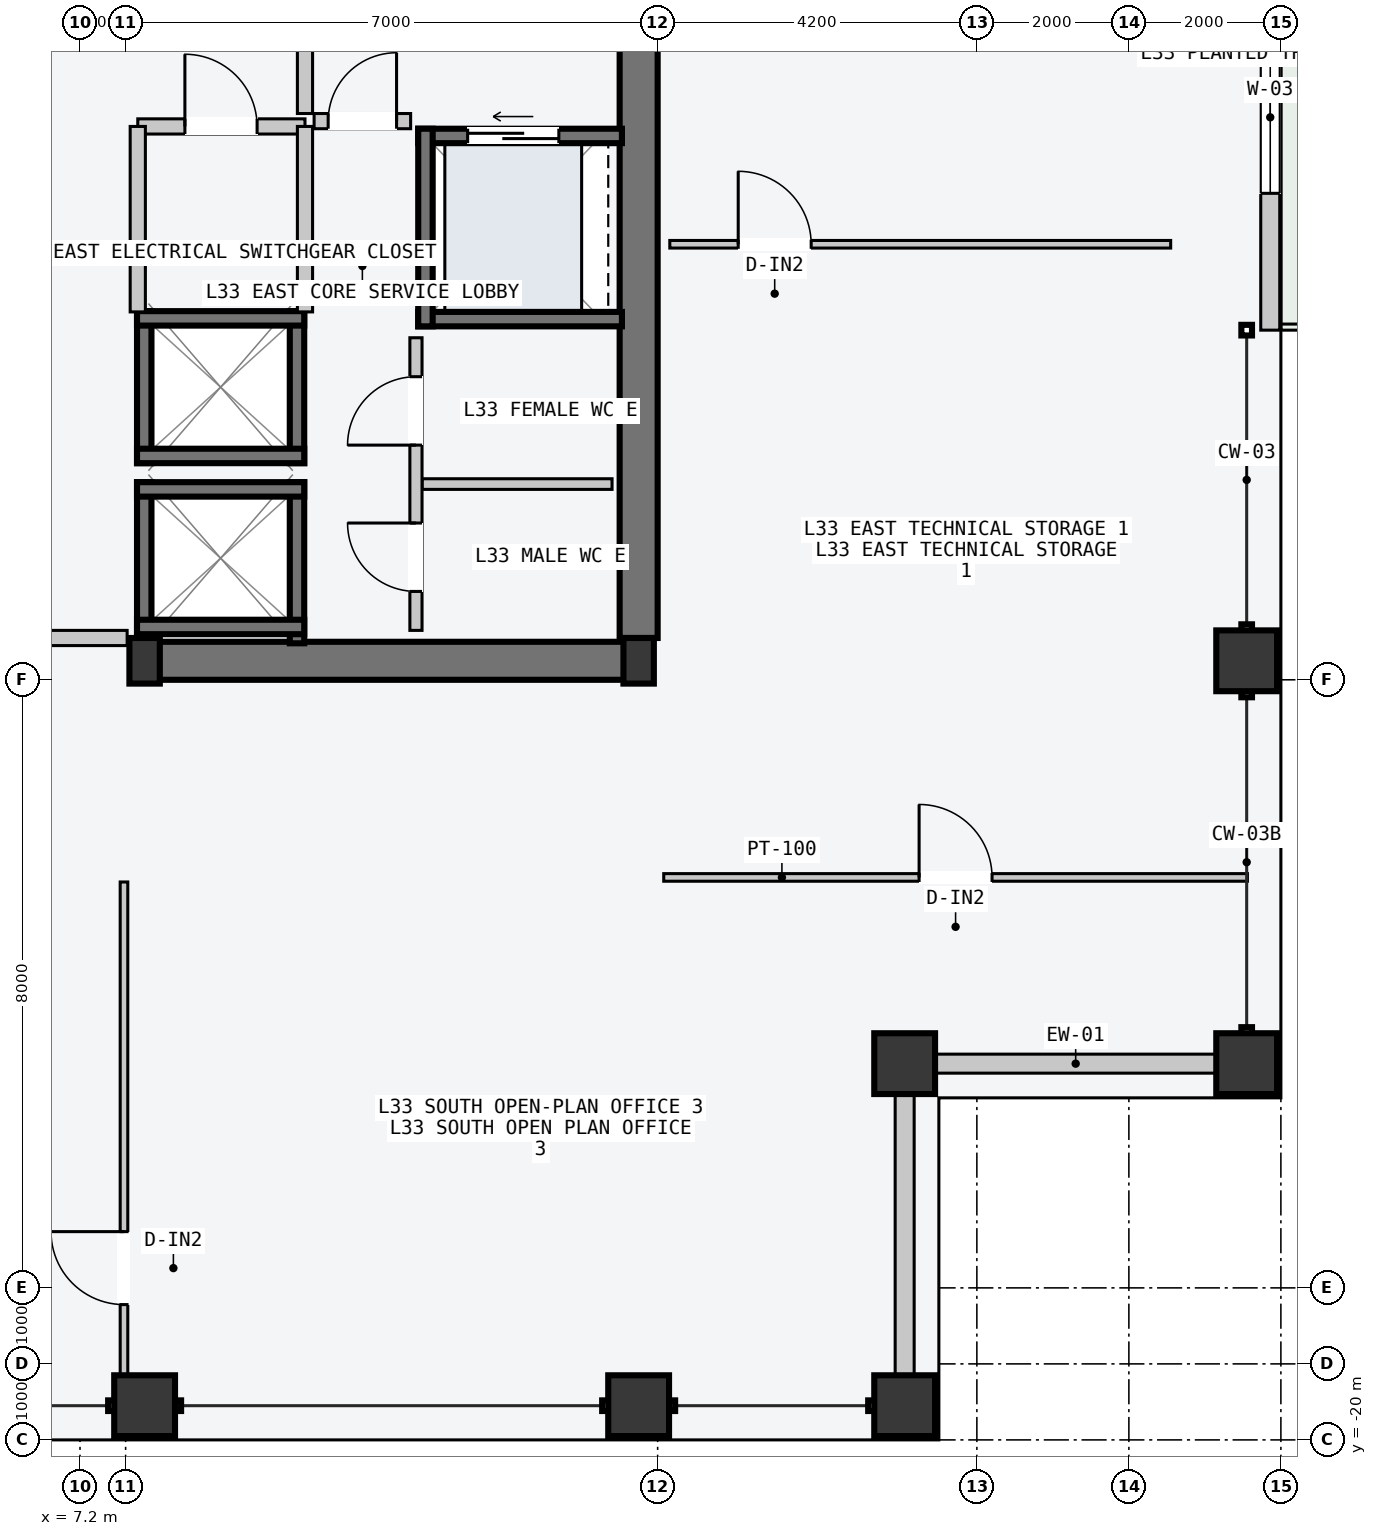
"""IFC4 building model, lengths in metres.
Left out: names, types, materials, properties, quantities, classifications, styles, units other than length and angle.
Written with IfcOpenShell. Run it as: python <this file> out.ifc"""

import sys

from ifc_helpers import new_model, si_unit, direction, frame, frame_2d, origin, origin_2d, place, context, subcontext, project, spatial, rectangle, hollow_rectangle, i_section, extrude, element, fill, save


model = new_model("IFC4")
c1 = context("Model", 3, precision=1e-05, world=origin(), true_north=direction((0.0, 1.0)))
c2 = subcontext(c1, "Body", "Model", "MODEL_VIEW")
j1 = project(units=[si_unit("LENGTHUNIT", "METRE"), si_unit("PLANEANGLEUNIT", "RADIAN")], contexts=[c1])
p1 = place(None, origin())
s1 = spatial("IfcSite", under=j1, at=p1, CompositionType="ELEMENT")
p2 = place(p1, origin())
s2 = spatial("IfcBuilding", under=s1, at=p2, CompositionType="ELEMENT")
p3 = place(p2, frame((0.0, 0.0, 127.8)))
s3 = spatial("IfcBuildingStorey", under=s2, at=p3, CompositionType="ELEMENT", Elevation=127.8)
p4 = place(p3, frame((8.07, -9.75, -0.2), z_axis=(0.0, 0.0, 1.0), x_axis=(1.0, 0.0, 0.0)))
e1 = element("IfcWall", 1, at=p4, inside=s3, PredefinedType="SHEAR", context=c2, shape_type="SweptSolid", body=[
    extrude(rectangle(XDim=6.46, YDim=0.5, at=frame_2d((3.23, 0.0))), origin(), (0.0, 0.0, 1.0), 3.6),
])
p5 = place(p3, frame((14.55, -9.45, -0.2), z_axis=(0.0, 0.0, 1.0), x_axis=(0.0, 1.0, 0.0)))
e2 = element("IfcWall", 2, at=p5, inside=s3, PredefinedType="SHEAR", context=c2, shape_type="SweptSolid", body=[
    extrude(rectangle(XDim=9.15, YDim=0.5, at=frame_2d((4.575, 0.0))), origin(), (0.0, 0.0, 1.0), 3.6),
])
for number, where, z_axis, x_axis in (
    (3, (8.05, -9.75, 0.0), (0.0, 0.0, 1.0), (1.0, 0.0, 0.0)),
    (4, (14.55, -9.75, 0.0), (0.0, 0.0, 1.0), (1.0, 0.0, 0.0)),
):
    element("IfcColumn", number, at=place(p3, frame(where, z_axis=z_axis, x_axis=x_axis)), inside=s3, PredefinedType="COLUMN", context=c2, shape_type="SweptSolid", body=[
        extrude(i_section(OverallWidth=0.4, OverallDepth=0.6, WebThickness=0.022, FlangeThickness=0.036, at=origin_2d()), origin(), (0.0, 0.0, 1.0), 3.6),
    ])
for number, where, z_axis, x_axis in (
    (5, (8.05, -19.55, 0.0), (0.0, 0.0, 1.0), (1.0, 0.0, 0.0)),
    (6, (14.55, -19.55, 0.0), (0.0, 0.0, 1.0), (1.0, 0.0, 0.0)),
    (7, (18.05, -19.55, 0.0), (0.0, 0.0, 1.0), (1.0, 0.0, 0.0)),
    (8, (22.55, -15.05, 0.0), (0.0, 0.0, 1.0), (0.0, 1.0, 0.0)),
    (9, (22.55, -9.75, 0.0), (0.0, 0.0, 1.0), (0.0, 1.0, 0.0)),
    (10, (18.05, -15.05, 0.0), (0.0, 0.0, 1.0), (1.0, 0.0, 0.0)),
):
    element("IfcColumn", number, at=place(p3, frame(where, z_axis=z_axis, x_axis=x_axis)), inside=s3, PredefinedType="COLUMN", context=c2, shape_type="SweptSolid", body=[
        extrude(hollow_rectangle(XDim=0.8, YDim=0.8, WallThickness=0.036, at=origin_2d()), origin(), (0.0, 0.0, 1.0), 3.6),
    ])
p6 = place(p3, frame((22.86, -5.4, 0.0), z_axis=(0.0, 0.0, 1.0), x_axis=(0.0, 1.0, 0.0)))
e11 = element("IfcWall", 11, at=p6, inside=s3, PredefinedType="STANDARD", context=c2, shape_type="SweptSolid", body=[
    extrude(rectangle(XDim=10.8, YDim=0.25, at=frame_2d((5.4, 0.0))), origin(), (0.0, 0.0, 1.0), 3.4),
])
p7 = place(p6, frame((7.2, 0.0, 0.0)))
e12 = element("IfcOpeningElement", 12, at=p7, cuts=e11, PredefinedType="OPENING", context=c2, shape_type="SweptSolid", body=[
    extrude(rectangle(XDim=1.6, YDim=2.2, at=frame_2d((0.8, 1.1))), frame((0.0, 0.135, 0.0), z_axis=(0.0, -1.0, 0.0), x_axis=(1.0, 0.0, 0.0)), (0.0, 0.0, 1.0), 0.27),
])
p8 = place(p6, frame((1.8, 0.0, 0.85)))
e13 = element("IfcOpeningElement", 13, at=p8, cuts=e11, PredefinedType="OPENING", context=c2, shape_type="SweptSolid", body=[
    extrude(rectangle(XDim=2.0, YDim=2.1, at=frame_2d((1.0, 1.05))), frame((0.0, 0.135, 0.0), z_axis=(0.0, -1.0, 0.0), x_axis=(1.0, 0.0, 0.0)), (0.0, 0.0, 1.0), 0.27),
])
for number, where, z_axis, x_axis in (
    (14, (18.46, -15.05, 0.0), (0.0, 0.0, 1.0), (1.0, 0.0, 0.0)),
    (15, (18.05, -19.14, 0.0), (0.0, 0.0, 1.0), (0.0, 1.0, 0.0)),
):
    element("IfcWall", number, at=place(p3, frame(where, z_axis=z_axis, x_axis=x_axis)), inside=s3, PredefinedType="STANDARD", context=c2, shape_type="SweptSolid", body=[
        extrude(rectangle(XDim=3.68, YDim=0.25, at=frame_2d((1.84, 0.0))), origin(), (0.0, 0.0, 1.0), 2.75),
    ])
for number, where, z_axis, x_axis in (
    (16, (8.045, -9.52, -0.2), (0.0, 0.0, 1.0), (0.0, 1.0, 0.0)),
    (17, (10.055, -9.52, -0.2), (0.0, 0.0, 1.0), (0.0, 1.0, 0.0)),
):
    element("IfcWall", number, at=place(p3, frame(where, z_axis=z_axis, x_axis=x_axis)), inside=s3, PredefinedType="SOLIDWALL", context=c2, shape_type="SweptSolid", body=[
        extrude(rectangle(XDim=2.12, YDim=0.19, at=frame_2d((1.06, 0.0))), origin(), (0.0, 0.0, 1.0), 3.6),
    ])
for number, where, z_axis, x_axis in (
    (18, (7.95, -7.495, -0.2), (0.0, 0.0, 1.0), (1.0, 0.0, 0.0)),
    (19, (7.95, -9.305, -0.2), (0.0, 0.0, 1.0), (1.0, 0.0, 0.0)),
):
    element("IfcWall", number, at=place(p3, frame(where, z_axis=z_axis, x_axis=x_axis)), inside=s3, PredefinedType="SOLIDWALL", context=c2, shape_type="SweptSolid", body=[
        extrude(rectangle(XDim=2.2, YDim=0.19, at=frame_2d((1.1, 0.0))), origin(), (0.0, 0.0, 1.0), 3.6),
    ])
for number, where, z_axis, x_axis in (
    (20, (8.045, -7.15, -0.2), (0.0, 0.0, 1.0), (0.0, 1.0, 0.0)),
    (21, (10.055, -7.15, -0.2), (0.0, 0.0, 1.0), (0.0, 1.0, 0.0)),
):
    element("IfcWall", number, at=place(p3, frame(where, z_axis=z_axis, x_axis=x_axis)), inside=s3, PredefinedType="SOLIDWALL", context=c2, shape_type="SweptSolid", body=[
        extrude(rectangle(XDim=2.0, YDim=0.19, at=frame_2d((1.0, 0.0))), origin(), (0.0, 0.0, 1.0), 3.6),
    ])
for number, where, z_axis, x_axis in (
    (22, (7.95, -5.245, -0.2), (0.0, 0.0, 1.0), (1.0, 0.0, 0.0)),
    (23, (7.95, -7.055, -0.2), (0.0, 0.0, 1.0), (1.0, 0.0, 0.0)),
):
    element("IfcWall", number, at=place(p3, frame(where, z_axis=z_axis, x_axis=x_axis)), inside=s3, PredefinedType="SOLIDWALL", context=c2, shape_type="SweptSolid", body=[
        extrude(rectangle(XDim=2.2, YDim=0.19, at=frame_2d((1.1, 0.0))), origin(), (0.0, 0.0, 1.0), 3.6),
    ])
p9 = place(p3, frame((11.65, -2.845, -0.2), z_axis=(0.0, 0.0, 1.0), x_axis=(1.0, 0.0, 0.0)))
e24 = element("IfcWall", 24, at=p9, inside=s3, PredefinedType="SOLIDWALL", context=c2, shape_type="SweptSolid", body=[
    extrude(rectangle(XDim=2.68, YDim=0.19, at=frame_2d((1.34, 0.0))), origin(), (0.0, 0.0, 1.0), 3.6),
])
p10 = place(p9, frame((0.65, 0.0, 0.2)))
e25 = element("IfcOpeningElement", 25, at=p10, cuts=e24, PredefinedType="OPENING", context=c2, shape_type="SweptSolid", body=[
    extrude(rectangle(XDim=1.2, YDim=2.2, at=frame_2d((0.6, 1.1))), frame((0.0, 0.105, 0.0), z_axis=(0.0, -1.0, 0.0), x_axis=(1.0, 0.0, 0.0)), (0.0, 0.0, 1.0), 0.21),
])
p11 = place(p3, frame((11.65, -5.255, -0.2), z_axis=(0.0, 0.0, 1.0), x_axis=(1.0, 0.0, 0.0)))
e26 = element("IfcWall", 26, at=p11, inside=s3, PredefinedType="SOLIDWALL", context=c2, shape_type="SweptSolid", body=[
    extrude(rectangle(XDim=2.68, YDim=0.19, at=frame_2d((1.34, 0.0))), origin(), (0.0, 0.0, 1.0), 3.6),
])
p12 = place(p3, frame((11.745, -5.35, -0.2), z_axis=(0.0, 0.0, 1.0), x_axis=(0.0, 1.0, 0.0)))
e27 = element("IfcWall", 27, at=p12, inside=s3, PredefinedType="SOLIDWALL", context=c2, shape_type="SweptSolid", body=[
    extrude(rectangle(XDim=2.6, YDim=0.19, at=frame_2d((1.3, 0.0))), origin(), (0.0, 0.0, 1.0), 3.6),
])
p13 = place(p3, frame((6.02, -9.45, 0.0), z_axis=(0.0, 0.0, 1.0), x_axis=(1.0, 0.0, 0.0)))
e28 = element("IfcWall", 28, at=p13, inside=s3, PredefinedType="PARTITIONING", context=c2, shape_type="SweptSolid", body=[
    extrude(rectangle(XDim=1.8, YDim=0.2, at=frame_2d((0.9, 0.0))), origin(), (0.0, 0.0, 1.0), 3.4),
])
p14 = place(p3, frame((10.16, -2.55, 0.0), z_axis=(0.0, 0.0, 1.0), x_axis=(0.0, 1.0, 0.0)))
e29 = element("IfcWall", 29, at=p14, inside=s3, PredefinedType="PARTITIONING", context=c2, shape_type="SweptSolid", body=[
    extrude(rectangle(XDim=3.4, YDim=0.2, at=frame_2d((1.7, 0.0))), origin(), (0.0, 0.0, 1.0), 3.4),
])
p15 = place(p14, frame((1.3, 0.0, 0.0)))
e30 = element("IfcOpeningElement", 30, at=p15, cuts=e29, PredefinedType="OPENING", context=c2, shape_type="SweptSolid", body=[
    extrude(rectangle(XDim=1.1, YDim=2.15, at=frame_2d((0.55, 1.075))), frame((0.0, 0.11, 0.0), z_axis=(0.0, -1.0, 0.0), x_axis=(1.0, 0.0, 0.0)), (0.0, 0.0, 1.0), 0.22),
])
p16 = place(p3, frame((10.28, -2.65, 0.0), z_axis=(0.0, 0.0, 1.0), x_axis=(1.0, 0.0, 0.0)))
e31 = element("IfcWall", 31, at=p16, inside=s3, PredefinedType="PARTITIONING", context=c2, shape_type="SweptSolid", body=[
    extrude(rectangle(XDim=1.27, YDim=0.2, at=frame_2d((0.635, 0.0))), origin(), (0.0, 0.0, 1.0), 3.4),
])
p17 = place(p16, frame((0.185, 0.0, 0.0)))
e32 = element("IfcOpeningElement", 32, at=p17, cuts=e31, PredefinedType="OPENING", context=c2, shape_type="SweptSolid", body=[
    extrude(rectangle(XDim=0.9, YDim=2.15, at=frame_2d((0.45, 1.075))), frame((0.0, 0.11, 0.0), z_axis=(0.0, -1.0, 0.0), x_axis=(1.0, 0.0, 0.0)), (0.0, 0.0, 1.0), 0.22),
])
p18 = place(p3, frame((7.96, -2.72, 0.0), z_axis=(0.0, 0.0, 1.0), x_axis=(1.0, 0.0, 0.0)))
e33 = element("IfcWall", 33, at=p18, inside=s3, PredefinedType="PARTITIONING", context=c2, shape_type="SweptSolid", body=[
    extrude(rectangle(XDim=2.2, YDim=0.2, at=frame_2d((1.1, 0.0))), origin(), (0.0, 0.0, 1.0), 3.4),
])
p19 = place(p18, frame((0.62, 0.0, 0.0)))
e34 = element("IfcOpeningElement", 34, at=p19, cuts=e33, PredefinedType="OPENING", context=c2, shape_type="SweptSolid", body=[
    extrude(rectangle(XDim=0.95, YDim=2.1, at=frame_2d((0.475, 1.05))), frame((0.0, 0.11, 0.0), z_axis=(0.0, -1.0, 0.0), x_axis=(1.0, 0.0, 0.0)), (0.0, 0.0, 1.0), 0.22),
])
for number, where, z_axis, x_axis in (
    (35, (7.96, -5.16, 0.0), (0.0, 0.0, 1.0), (0.0, 1.0, 0.0)),
    (36, (10.16, -5.16, 0.0), (0.0, 0.0, 1.0), (0.0, 1.0, 0.0)),
):
    element("IfcWall", number, at=place(p3, frame(where, z_axis=z_axis, x_axis=x_axis)), inside=s3, PredefinedType="PARTITIONING", context=c2, shape_type="SweptSolid", body=[
        extrude(rectangle(XDim=2.44, YDim=0.2, at=frame_2d((1.22, 0.0))), origin(), (0.0, 0.0, 1.0), 3.4),
    ])
p20 = place(p3, frame((11.7, -7.425, 0.0), z_axis=(0.0, 0.0, 1.0), x_axis=(1.0, 0.0, 0.0)))
e37 = element("IfcWall", 37, at=p20, inside=s3, PredefinedType="PARTITIONING", context=c2, shape_type="SweptSolid", body=[
    extrude(rectangle(XDim=2.5, YDim=0.14, at=frame_2d((1.25, 0.0))), origin(), (0.0, 0.0, 1.0), 3.4),
])
p21 = place(p3, frame((11.62, -9.35, 0.0), z_axis=(0.0, 0.0, 1.0), x_axis=(0.0, 1.0, 0.0)))
e38 = element("IfcWall", 38, at=p21, inside=s3, PredefinedType="PARTITIONING", context=c2, shape_type="SweptSolid", body=[
    extrude(rectangle(XDim=3.85, YDim=0.16, at=frame_2d((1.925, 0.0))), origin(), (0.0, 0.0, 1.0), 3.4),
])
p22 = place(p21, frame((0.512, 0.0, 0.0)))
e39 = element("IfcOpeningElement", 39, at=p22, cuts=e38, PredefinedType="OPENING", context=c2, shape_type="SweptSolid", body=[
    extrude(rectangle(XDim=0.9, YDim=2.15, at=frame_2d((0.45, 1.075))), frame((0.0, 0.09, 0.0), z_axis=(0.0, -1.0, 0.0), x_axis=(1.0, 0.0, 0.0)), (0.0, 0.0, 1.0), 0.18),
])
p23 = place(p21, frame((2.438, 0.0, 0.0)))
e40 = element("IfcOpeningElement", 40, at=p23, cuts=e38, PredefinedType="OPENING", context=c2, shape_type="SweptSolid", body=[
    extrude(rectangle(XDim=0.9, YDim=2.15, at=frame_2d((0.45, 1.075))), frame((0.0, 0.09, 0.0), z_axis=(0.0, -1.0, 0.0), x_axis=(1.0, 0.0, 0.0)), (0.0, 0.0, 1.0), 0.18),
])
p24 = place(p3, frame((7.779, -19.56, 0.0), z_axis=(0.0, 0.0, 1.0), x_axis=(0.0, 1.0, 0.0)))
e41 = element("IfcWall", 41, at=p24, inside=s3, PredefinedType="PARTITIONING", context=c2, shape_type="SweptSolid", body=[
    extrude(rectangle(XDim=6.9, YDim=0.1, at=frame_2d((3.45, 0.0))), origin(), (0.0, 0.0, 1.0), 3.4),
])
p25 = place(p24, frame((1.34, 0.0, 0.0)))
e42 = element("IfcOpeningElement", 42, at=p25, cuts=e41, PredefinedType="OPENING", context=c2, shape_type="SweptSolid", body=[
    extrude(rectangle(XDim=0.96, YDim=2.18, at=frame_2d((0.48, 1.09))), frame((0.0, 0.06, 0.0), z_axis=(0.0, -1.0, 0.0), x_axis=(1.0, 0.0, 0.0)), (0.0, 0.0, 1.0), 0.12),
])
p26 = place(p3, frame((14.88, -12.6, 0.0), z_axis=(0.0, 0.0, 1.0), x_axis=(1.0, 0.0, 0.0)))
e43 = element("IfcWall", 43, at=p26, inside=s3, PredefinedType="PARTITIONING", context=c2, shape_type="SweptSolid", body=[
    extrude(rectangle(XDim=7.68, YDim=0.1, at=frame_2d((3.84, 0.0))), origin(), (0.0, 0.0, 1.0), 3.4),
])
p27 = place(p26, frame((3.36, 0.0, 0.0)))
e44 = element("IfcOpeningElement", 44, at=p27, cuts=e43, PredefinedType="OPENING", context=c2, shape_type="SweptSolid", body=[
    extrude(rectangle(XDim=0.96, YDim=2.18, at=frame_2d((0.48, 1.09))), frame((0.0, 0.06, 0.0), z_axis=(0.0, -1.0, 0.0), x_axis=(1.0, 0.0, 0.0)), (0.0, 0.0, 1.0), 0.12),
])
p28 = place(p3, frame((14.96, -4.27, 0.0), z_axis=(0.0, 0.0, 1.0), x_axis=(1.0, 0.0, 0.0)))
e45 = element("IfcWall", 45, at=p28, inside=s3, PredefinedType="PARTITIONING", context=c2, shape_type="SweptSolid", body=[
    extrude(rectangle(XDim=6.59, YDim=0.1, at=frame_2d((3.295, 0.0))), origin(), (0.0, 0.0, 1.0), 3.4),
])
p29 = place(p28, frame((0.9, 0.0, 0.0)))
e46 = element("IfcOpeningElement", 46, at=p29, cuts=e45, PredefinedType="OPENING", context=c2, shape_type="SweptSolid", body=[
    extrude(rectangle(XDim=0.96, YDim=2.18, at=frame_2d((0.48, 1.09))), frame((0.0, 0.06, 0.0), z_axis=(0.0, -1.0, 0.0), x_axis=(1.0, 0.0, 0.0)), (0.0, 0.0, 1.0), 0.12),
])
p30 = place(p8, origin())
e47 = element("IfcWindow", 47, at=p30, inside=s3, PartitioningType="SINGLE_PANEL", PredefinedType="WINDOW", context=c2, shape_type="SweptSolid", body=[
    extrude(rectangle(XDim=2.0, YDim=2.1, at=frame_2d((1.0, 1.05))), frame((0.0, 0.03, 0.0), z_axis=(0.0, -1.0, 0.0), x_axis=(1.0, 0.0, 0.0)), (0.0, 0.0, 1.0), 0.06),
])
fill(e13, e47)
p31 = place(p10, origin())
e48 = element("IfcDoor", 48, at=p31, inside=s3, OperationType="SLIDING_TO_LEFT", PredefinedType="DOOR", context=c2, shape_type="SweptSolid", body=[
    extrude(rectangle(XDim=1.2, YDim=2.2, at=frame_2d((0.6, 1.1))), frame((0.0, 0.025, 0.0), z_axis=(0.0, -1.0, 0.0), x_axis=(1.0, 0.0, 0.0)), (0.0, 0.0, 1.0), 0.05),
])
fill(e25, e48)
p32 = place(p17, origin())
e49 = element("IfcDoor", 49, at=p32, inside=s3, OperationType="SINGLE_SWING_RIGHT", PredefinedType="DOOR", context=c2, shape_type="SweptSolid", body=[
    extrude(rectangle(XDim=0.9, YDim=2.15, at=frame_2d((0.45, 1.075))), frame((0.0, 0.025, 0.0), z_axis=(0.0, -1.0, 0.0), x_axis=(1.0, 0.0, 0.0)), (0.0, 0.0, 1.0), 0.05),
])
fill(e32, e49)
p33 = place(p19, origin())
e50 = element("IfcDoor", 50, at=p33, inside=s3, OperationType="SINGLE_SWING_LEFT", PredefinedType="DOOR", context=c2, shape_type="SweptSolid", body=[
    extrude(rectangle(XDim=0.95, YDim=2.1, at=frame_2d((0.475, 1.05))), frame((0.0, 0.025, 0.0), z_axis=(0.0, -1.0, 0.0), x_axis=(1.0, 0.0, 0.0)), (0.0, 0.0, 1.0), 0.05),
])
fill(e34, e50)
p34 = place(p22, origin())
e51 = element("IfcDoor", 51, at=p34, inside=s3, OperationType="SINGLE_SWING_RIGHT", PredefinedType="DOOR", context=c2, shape_type="SweptSolid", body=[
    extrude(rectangle(XDim=0.9, YDim=2.15, at=frame_2d((0.45, 1.075))), frame((0.0, 0.025, 0.0), z_axis=(0.0, -1.0, 0.0), x_axis=(1.0, 0.0, 0.0)), (0.0, 0.0, 1.0), 0.05),
])
fill(e39, e51)
p35 = place(p23, origin())
e52 = element("IfcDoor", 52, at=p35, inside=s3, OperationType="SINGLE_SWING_LEFT", PredefinedType="DOOR", context=c2, shape_type="SweptSolid", body=[
    extrude(rectangle(XDim=0.9, YDim=2.15, at=frame_2d((0.45, 1.075))), frame((0.0, 0.025, 0.0), z_axis=(0.0, -1.0, 0.0), x_axis=(1.0, 0.0, 0.0)), (0.0, 0.0, 1.0), 0.05),
])
fill(e40, e52)
p36 = place(p25, origin())
e53 = element("IfcDoor", 53, at=p36, inside=s3, OperationType="SINGLE_SWING_RIGHT", PredefinedType="DOOR", context=c2, shape_type="SweptSolid", body=[
    extrude(rectangle(XDim=0.96, YDim=2.18, at=frame_2d((0.48, 1.09))), frame((0.0, 0.025, 0.0), z_axis=(0.0, -1.0, 0.0), x_axis=(1.0, 0.0, 0.0)), (0.0, 0.0, 1.0), 0.05),
])
fill(e42, e53)
p37 = place(p27, origin())
e54 = element("IfcDoor", 54, at=p37, inside=s3, OperationType="SINGLE_SWING_LEFT", PredefinedType="DOOR", context=c2, shape_type="SweptSolid", body=[
    extrude(rectangle(XDim=0.96, YDim=2.18, at=frame_2d((0.48, 1.09))), frame((0.0, 0.025, 0.0), z_axis=(0.0, -1.0, 0.0), x_axis=(1.0, 0.0, 0.0)), (0.0, 0.0, 1.0), 0.05),
])
fill(e44, e54)
p38 = place(p29, origin())
e55 = element("IfcDoor", 55, at=p38, inside=s3, OperationType="SINGLE_SWING_LEFT", PredefinedType="DOOR", context=c2, shape_type="SweptSolid", body=[
    extrude(rectangle(XDim=0.96, YDim=2.18, at=frame_2d((0.48, 1.09))), frame((0.0, 0.025, 0.0), z_axis=(0.0, -1.0, 0.0), x_axis=(1.0, 0.0, 0.0)), (0.0, 0.0, 1.0), 0.05),
])
fill(e46, e55)
save(model, sys.argv[1])
